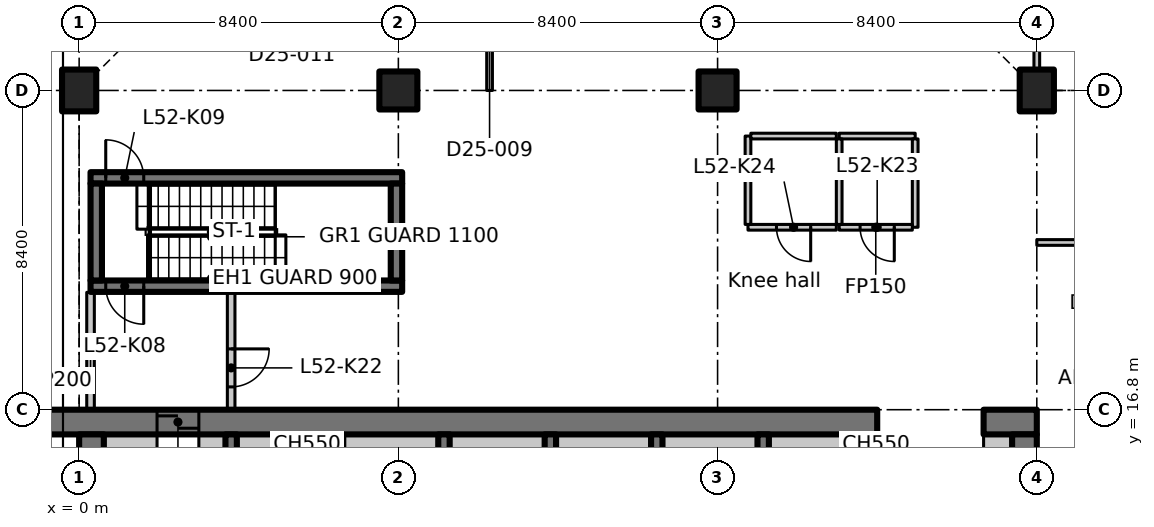
"""IFC4 building model, lengths in metres.
Left out: names, types, materials, properties, quantities, classifications, styles, units other than length and angle.
Written with IfcOpenShell. Run it as: python <this file> out.ifc"""

import sys

from ifc_helpers import new_model, si_unit, direction, frame, frame_2d, origin, origin_2d, place, context, subcontext, project, spatial, rectangle, extrude, element, fill, save


model = new_model("IFC4")
c1 = context("Model", 3, precision=1e-05, world=origin(), true_north=direction((0.0, 1.0)))
c2 = subcontext(c1, "Body", "Model", "MODEL_VIEW")
j1 = project(units=[si_unit("LENGTHUNIT", "METRE"), si_unit("PLANEANGLEUNIT", "RADIAN")], contexts=[c1])
p1 = place(None, origin())
s1 = spatial("IfcSite", under=j1, at=p1, CompositionType="ELEMENT")
p2 = place(p1, origin())
s2 = spatial("IfcBuilding", under=s1, at=p2, CompositionType="ELEMENT")
p3 = place(p2, frame((0.0, 0.0, 206.4)))
s3 = spatial("IfcBuildingStorey", under=s2, at=p3, CompositionType="ELEMENT", Elevation=206.4)
p4 = place(p3, frame((0.0, 25.2, 0.0), z_axis=(0.0, 0.0, 1.0), x_axis=(1.0, 0.0, 0.0)))
e1 = element("IfcColumn", 1, at=p4, inside=s3, PredefinedType="COLUMN", context=c2, shape_type="SweptSolid", body=[
    extrude(rectangle(XDim=0.9, YDim=1.1, at=origin_2d()), origin(), (0.0, 0.0, 1.0), 4.2),
])
for number, where, z_axis, x_axis in (
    (2, (8.4, 25.2, 0.0), (0.0, 0.0, 1.0), (1.0, 0.0, 0.0)),
    (3, (16.8, 25.2, 0.0), (0.0, 0.0, 1.0), (1.0, 0.0, 0.0)),
):
    element("IfcColumn", number, at=place(p3, frame(where, z_axis=z_axis, x_axis=x_axis)), inside=s3, PredefinedType="COLUMN", context=c2, shape_type="SweptSolid", body=[
        extrude(rectangle(XDim=1.0, YDim=1.0, at=origin_2d()), origin(), (0.0, 0.0, 1.0), 4.2),
    ])
p5 = place(p3, frame((25.2, 25.2, 0.0), z_axis=(0.0, 0.0, 1.0), x_axis=(1.0, 0.0, 0.0)))
e4 = element("IfcColumn", 4, at=p5, inside=s3, PredefinedType="COLUMN", context=c2, shape_type="SweptSolid", body=[
    extrude(rectangle(XDim=0.9, YDim=1.1, at=origin_2d()), origin(), (0.0, 0.0, 1.0), 4.2),
])
p6 = place(p3, frame((-1.1, 16.475, 0.0), z_axis=(0.0, 0.0, 1.0), x_axis=(1.0, 0.0, 0.0)))
e5 = element("IfcWall", 5, at=p6, inside=s3, PredefinedType="SHEAR", context=c2, shape_type="SweptSolid", body=[
    extrude(rectangle(XDim=22.1, YDim=0.65, at=frame_2d((11.05, 0.0))), origin(), (0.0, 0.0, 1.0), 4.2),
])
p7 = place(p6, frame((3.15, 0.0, 0.0)))
e6 = element("IfcOpeningElement", 6, at=p7, cuts=e5, PredefinedType="OPENING", context=c2, shape_type="SweptSolid", body=[
    extrude(rectangle(XDim=1.1, YDim=2.3, at=frame_2d((0.55, 1.15))), frame((0.0, 0.335, 0.0), z_axis=(0.0, -1.0, 0.0), x_axis=(1.0, 0.0, 0.0)), (0.0, 0.0, 1.0), 0.67),
])
p8 = place(p3, frame((23.8, 16.475, 0.0), z_axis=(0.0, 0.0, 1.0), x_axis=(1.0, 0.0, 0.0)))
e7 = element("IfcWall", 7, at=p8, inside=s3, PredefinedType="SHEAR", context=c2, shape_type="SweptSolid", body=[
    extrude(rectangle(XDim=1.4, YDim=0.65, at=frame_2d((0.7, 0.0))), origin(), (0.0, 0.0, 1.0), 4.2),
])
p9 = place(p3, frame((0.325, 7.286, 0.0), z_axis=(0.0, 0.0, 1.0), x_axis=(0.0, 1.0, 0.0)))
e8 = element("IfcWall", 8, at=p9, inside=s3, PredefinedType="SHEAR", context=c2, shape_type="SweptSolid", body=[
    extrude(rectangle(XDim=8.864, YDim=0.65, at=frame_2d((4.432, 0.0))), origin(), (0.0, 0.0, 1.0), 4.2),
])
p10 = place(p3, frame((24.875, 12.6, 0.0), z_axis=(0.0, 0.0, 1.0), x_axis=(0.0, 1.0, 0.0)))
e9 = element("IfcWall", 9, at=p10, inside=s3, PredefinedType="SHEAR", context=c2, shape_type="SweptSolid", body=[
    extrude(rectangle(XDim=3.55, YDim=0.65, at=frame_2d((1.775, 0.0))), origin(), (0.0, 0.0, 1.0), 4.2),
])
p11 = place(p3, frame((0.65, 15.875, 0.0), z_axis=(0.0, 0.0, 1.0), x_axis=(1.0, 0.0, 0.0)))
e10 = element("IfcWall", 10, at=p11, inside=s3, PredefinedType="PARTITIONING", context=c2, shape_type="SweptSolid", body=[
    extrude(rectangle(XDim=1.4, YDim=0.55, at=frame_2d((0.7, 0.0))), origin(), (0.0, 0.0, 1.0), 4.2),
])
p12 = place(p3, frame((23.8, 15.875, 0.0), z_axis=(0.0, 0.0, 1.0), x_axis=(1.0, 0.0, 0.0)))
e11 = element("IfcWall", 11, at=p12, inside=s3, PredefinedType="PARTITIONING", context=c2, shape_type="SweptSolid", body=[
    extrude(rectangle(XDim=0.75, YDim=0.55, at=frame_2d((0.375, 0.0))), origin(), (0.0, 0.0, 1.0), 4.2),
])
for number, where, z_axis, x_axis in (
    (12, (4.0, 12.95, 0.0), (0.0, 0.0, 1.0), (0.0, 1.0, 0.0)),
    (13, (6.8, 12.95, 0.0), (0.0, 0.0, 1.0), (0.0, 1.0, 0.0)),
    (14, (9.6, 12.95, 0.0), (0.0, 0.0, 1.0), (0.0, 1.0, 0.0)),
    (15, (12.4, 12.95, 0.0), (0.0, 0.0, 1.0), (0.0, 1.0, 0.0)),
    (16, (15.2, 12.95, 0.0), (0.0, 0.0, 1.0), (0.0, 1.0, 0.0)),
    (17, (18.0, 12.95, 0.0), (0.0, 0.0, 1.0), (0.0, 1.0, 0.0)),
    (18, (20.8, 12.95, 0.0), (0.0, 0.0, 1.0), (0.0, 1.0, 0.0)),
):
    element("IfcWall", number, at=place(p3, frame(where, z_axis=z_axis, x_axis=x_axis)), inside=s3, PredefinedType="SHEAR", context=c2, shape_type="SweptSolid", body=[
        extrude(rectangle(XDim=3.2, YDim=0.3, at=frame_2d((1.6, 0.0))), origin(), (0.0, 0.0, 1.0), 4.2),
    ])
p13 = place(p3, frame((8.5, 20.05, 0.0), z_axis=(0.0, 0.0, 1.0), x_axis=(-1.0, 0.0, 0.0)))
e19 = element("IfcWall", 19, at=p13, inside=s3, PredefinedType="SHEAR", context=c2, shape_type="SweptSolid", body=[
    extrude(rectangle(XDim=8.2, YDim=0.3, at=frame_2d((4.1, 0.0))), origin(), (0.0, 0.0, 1.0), 4.2),
])
p14 = place(p13, frame((6.8, 0.0, 0.0)))
e20 = element("IfcOpeningElement", 20, at=p14, cuts=e19, PredefinedType="OPENING", context=c2, shape_type="SweptSolid", body=[
    extrude(rectangle(XDim=1.0, YDim=2.1, at=frame_2d((0.5, 1.05))), frame((0.0, 0.16, 0.0), z_axis=(0.0, -1.0, 0.0), x_axis=(1.0, 0.0, 0.0)), (0.0, 0.0, 1.0), 0.32),
])
p15 = place(p3, frame((0.3, 22.9, 0.0), z_axis=(0.0, 0.0, 1.0), x_axis=(1.0, 0.0, 0.0)))
e21 = element("IfcWall", 21, at=p15, inside=s3, PredefinedType="SHEAR", context=c2, shape_type="SweptSolid", body=[
    extrude(rectangle(XDim=8.2, YDim=0.3, at=frame_2d((4.1, 0.0))), origin(), (0.0, 0.0, 1.0), 4.2),
])
p16 = place(p15, frame((0.4, 0.0, 0.0)))
e22 = element("IfcOpeningElement", 22, at=p16, cuts=e21, PredefinedType="OPENING", context=c2, shape_type="SweptSolid", body=[
    extrude(rectangle(XDim=1.0, YDim=2.1, at=frame_2d((0.5, 1.05))), frame((0.0, 0.16, 0.0), z_axis=(0.0, -1.0, 0.0), x_axis=(1.0, 0.0, 0.0)), (0.0, 0.0, 1.0), 0.32),
])
for number, where, z_axis, x_axis in (
    (23, (0.45, 20.2, 0.0), (0.0, 0.0, 1.0), (0.0, 1.0, 0.0)),
    (24, (8.35, 20.2, 0.0), (0.0, 0.0, 1.0), (0.0, 1.0, 0.0)),
):
    element("IfcWall", number, at=place(p3, frame(where, z_axis=z_axis, x_axis=x_axis)), inside=s3, PredefinedType="SHEAR", context=c2, shape_type="SweptSolid", body=[
        extrude(rectangle(XDim=2.55, YDim=0.3, at=frame_2d((1.275, 0.0))), origin(), (0.0, 0.0, 1.0), 4.2),
    ])
p17 = place(p3, frame((0.3, 16.812, 0.0), z_axis=(0.0, 0.0, 1.0), x_axis=(0.0, 1.0, 0.0)))
e25 = element("IfcWall", 25, at=p17, inside=s3, PredefinedType="PARTITIONING", context=c2, shape_type="SweptSolid", body=[
    extrude(rectangle(XDim=3.076, YDim=0.2, at=frame_2d((1.538, 0.0))), origin(), (0.0, 0.0, 1.0), 3.83),
])
p18 = place(p3, frame((4.0, 19.888, 0.0), z_axis=(0.0, 0.0, 1.0), x_axis=(0.0, -1.0, 0.0)))
e26 = element("IfcWall", 26, at=p18, inside=s3, PredefinedType="PARTITIONING", context=c2, shape_type="SweptSolid", body=[
    extrude(rectangle(XDim=3.076, YDim=0.2, at=frame_2d((1.538, 0.0))), origin(), (0.0, 0.0, 1.0), 4.2),
])
p19 = place(p18, frame((1.488, 0.0, 0.0)))
e27 = element("IfcOpeningElement", 27, at=p19, cuts=e26, PredefinedType="OPENING", context=c2, shape_type="SweptSolid", body=[
    extrude(rectangle(XDim=1.0, YDim=2.1, at=frame_2d((0.5, 1.05))), frame((0.0, 0.11, 0.0), z_axis=(0.0, -1.0, 0.0), x_axis=(1.0, 0.0, 0.0)), (0.0, 0.0, 1.0), 0.22),
])
p20 = place(p3, frame((20.0, 24.0, 0.0), z_axis=(0.0, 0.0, 1.0), x_axis=(1.0, 0.0, 0.0)))
e28 = element("IfcWall", 28, at=p20, inside=s3, PredefinedType="PARTITIONING", context=c2, shape_type="SweptSolid", body=[
    extrude(rectangle(XDim=2.0, YDim=0.15, at=frame_2d((1.0, 0.0))), origin(), (0.0, 0.0, 1.0), 4.2),
])
p21 = place(p3, frame((22.0, 23.925, 0.0), z_axis=(0.0, 0.0, 1.0), x_axis=(0.0, -1.0, 0.0)))
e29 = element("IfcWall", 29, at=p21, inside=s3, PredefinedType="PARTITIONING", context=c2, shape_type="SweptSolid", body=[
    extrude(rectangle(XDim=2.325, YDim=0.15, at=frame_2d((1.163, 0.0))), origin(), (0.0, 0.0, 1.0), 4.2),
])
p22 = place(p3, frame((21.925, 21.6, 0.0), z_axis=(0.0, 0.0, 1.0), x_axis=(-1.0, 0.0, 0.0)))
e30 = element("IfcWall", 30, at=p22, inside=s3, PredefinedType="PARTITIONING", context=c2, shape_type="SweptSolid", body=[
    extrude(rectangle(XDim=1.925, YDim=0.15, at=frame_2d((0.962, 0.0))), origin(), (0.0, 0.0, 1.0), 4.2),
])
p23 = place(p22, frame((0.475, 0.0, 0.0)))
e31 = element("IfcOpeningElement", 31, at=p23, cuts=e30, PredefinedType="OPENING", context=c2, shape_type="SweptSolid", body=[
    extrude(rectangle(XDim=0.9, YDim=2.1, at=frame_2d((0.45, 1.05))), frame((0.0, 0.085, 0.0), z_axis=(0.0, -1.0, 0.0), x_axis=(1.0, 0.0, 0.0)), (0.0, 0.0, 1.0), 0.17),
])
p24 = place(p3, frame((20.0, 21.675, 0.0), z_axis=(0.0, 0.0, 1.0), x_axis=(0.0, 1.0, 0.0)))
e32 = element("IfcWall", 32, at=p24, inside=s3, PredefinedType="PARTITIONING", context=c2, shape_type="SweptSolid", body=[
    extrude(rectangle(XDim=2.25, YDim=0.15, at=frame_2d((1.125, 0.0))), origin(), (0.0, 0.0, 1.0), 4.2),
])
p25 = place(p3, frame((19.925, 21.6, 0.0), z_axis=(0.0, 0.0, 1.0), x_axis=(-1.0, 0.0, 0.0)))
e33 = element("IfcWall", 33, at=p25, inside=s3, PredefinedType="PARTITIONING", context=c2, shape_type="SweptSolid", body=[
    extrude(rectangle(XDim=2.325, YDim=0.15, at=frame_2d((1.163, 0.0))), origin(), (0.0, 0.0, 1.0), 4.2),
])
p26 = place(p25, frame((0.675, 0.0, 0.0)))
e34 = element("IfcOpeningElement", 34, at=p26, cuts=e33, PredefinedType="OPENING", context=c2, shape_type="SweptSolid", body=[
    extrude(rectangle(XDim=0.9, YDim=2.1, at=frame_2d((0.45, 1.05))), frame((0.0, 0.085, 0.0), z_axis=(0.0, -1.0, 0.0), x_axis=(1.0, 0.0, 0.0)), (0.0, 0.0, 1.0), 0.17),
])
p27 = place(p3, frame((17.6, 21.675, 0.0), z_axis=(0.0, 0.0, 1.0), x_axis=(0.0, 1.0, 0.0)))
e35 = element("IfcWall", 35, at=p27, inside=s3, PredefinedType="PARTITIONING", context=c2, shape_type="SweptSolid", body=[
    extrude(rectangle(XDim=2.325, YDim=0.15, at=frame_2d((1.163, 0.0))), origin(), (0.0, 0.0, 1.0), 4.2),
])
p28 = place(p3, frame((17.675, 24.0, 0.0), z_axis=(0.0, 0.0, 1.0), x_axis=(1.0, 0.0, 0.0)))
e36 = element("IfcWall", 36, at=p28, inside=s3, PredefinedType="PARTITIONING", context=c2, shape_type="SweptSolid", body=[
    extrude(rectangle(XDim=2.25, YDim=0.15, at=frame_2d((1.125, 0.0))), origin(), (0.0, 0.0, 1.0), 4.2),
])
p29 = place(p3, frame((3.15, 15.875, 0.0), z_axis=(0.0, 0.0, 1.0), x_axis=(1.0, 0.0, 0.0)))
e37 = element("IfcWall", 37, at=p29, inside=s3, PredefinedType="PARTITIONING", context=c2, shape_type="SweptSolid", body=[
    extrude(rectangle(XDim=0.7, YDim=0.55, at=frame_2d((0.35, 0.0))), origin(), (0.0, 0.0, 1.0), 4.2),
])
for number, where, z_axis, x_axis in (
    (38, (4.15, 15.875, 0.0), (0.0, 0.0, 1.0), (1.0, 0.0, 0.0)),
    (39, (6.95, 15.875, 0.0), (0.0, 0.0, 1.0), (1.0, 0.0, 0.0)),
    (40, (9.75, 15.875, 0.0), (0.0, 0.0, 1.0), (1.0, 0.0, 0.0)),
    (41, (12.55, 15.875, 0.0), (0.0, 0.0, 1.0), (1.0, 0.0, 0.0)),
    (42, (15.35, 15.875, 0.0), (0.0, 0.0, 1.0), (1.0, 0.0, 0.0)),
    (43, (18.15, 15.875, 0.0), (0.0, 0.0, 1.0), (1.0, 0.0, 0.0)),
):
    element("IfcWall", number, at=place(p3, frame(where, z_axis=z_axis, x_axis=x_axis)), inside=s3, PredefinedType="PARTITIONING", context=c2, shape_type="SweptSolid", body=[
        extrude(rectangle(XDim=2.5, YDim=0.55, at=frame_2d((1.25, 0.0))), origin(), (0.0, 0.0, 1.0), 4.2),
    ])
p30 = place(p3, frame((20.95, 15.875, 0.0), z_axis=(0.0, 0.0, 1.0), x_axis=(1.0, 0.0, 0.0)))
e44 = element("IfcWall", 44, at=p30, inside=s3, PredefinedType="PARTITIONING", context=c2, shape_type="SweptSolid", body=[
    extrude(rectangle(XDim=0.05, YDim=0.55, at=frame_2d((0.025, 0.0))), origin(), (0.0, 0.0, 1.0), 4.2),
])
p31 = place(p3, frame((25.2, 21.2, 0.0), z_axis=(0.0, 0.0, 1.0), x_axis=(1.0, 0.0, 0.0)))
e45 = element("IfcWall", 45, at=p31, inside=s3, PredefinedType="PARTITIONING", context=c2, shape_type="SweptSolid", body=[
    extrude(rectangle(XDim=4.2, YDim=0.15, at=frame_2d((2.1, 0.0))), origin(), (0.0, 0.0, 1.0), 4.18),
])
p32 = place(p31, frame((1.5, 0.0, 0.0)))
e46 = element("IfcOpeningElement", 46, at=p32, cuts=e45, PredefinedType="OPENING", context=c2, shape_type="SweptSolid", body=[
    extrude(rectangle(XDim=1.0, YDim=2.1, at=frame_2d((0.5, 1.05))), frame((0.0, 0.085, 0.0), z_axis=(0.0, -1.0, 0.0), x_axis=(1.0, 0.0, 0.0)), (0.0, 0.0, 1.0), 0.17),
])
p33 = place(p3, frame((25.2, 25.77, 0.0), z_axis=(0.0, 0.0, 1.0), x_axis=(0.0, 1.0, 0.0)))
e47 = element("IfcWall", 47, at=p33, inside=s3, PredefinedType="PARTITIONING", context=c2, shape_type="SweptSolid", body=[
    extrude(rectangle(XDim=3.83, YDim=0.15, at=frame_2d((1.915, 0.0))), origin(), (0.0, 0.0, 1.0), 3.83),
])
p34 = place(p3, frame((10.8, 25.2, 0.0), z_axis=(0.0, 0.0, 1.0), x_axis=(0.0, 1.0, 0.0)))
e48 = element("IfcWall", 48, at=p34, inside=s3, PredefinedType="PARTITIONING", context=c2, shape_type="SweptSolid", body=[
    extrude(rectangle(XDim=4.2, YDim=0.15, at=frame_2d((2.1, 0.0))), origin(), (0.0, 0.0, 1.0), 4.18),
])
p35 = place(p34, frame((1.2, 0.0, 0.0)))
e49 = element("IfcOpeningElement", 49, at=p35, cuts=e48, PredefinedType="OPENING", context=c2, shape_type="SweptSolid", body=[
    extrude(rectangle(XDim=2.0, YDim=2.4, at=frame_2d((1.0, 1.2))), frame((0.0, 0.085, 0.0), z_axis=(0.0, -1.0, 0.0), x_axis=(1.0, 0.0, 0.0)), (0.0, 0.0, 1.0), 0.17),
])
p36 = place(p7, origin())
e50 = element("IfcDoor", 50, at=p36, inside=s3, OperationType="SLIDING_TO_LEFT", PredefinedType="DOOR", context=c2, shape_type="SweptSolid", body=[
    extrude(rectangle(XDim=1.1, YDim=2.3, at=frame_2d((0.55, 1.15))), frame((0.0, 0.025, 0.0), z_axis=(0.0, -1.0, 0.0), x_axis=(1.0, 0.0, 0.0)), (0.0, 0.0, 1.0), 0.05),
])
fill(e6, e50)
p37 = place(p14, origin())
e51 = element("IfcDoor", 51, at=p37, inside=s3, OperationType="SINGLE_SWING_LEFT", PredefinedType="DOOR", context=c2, shape_type="SweptSolid", body=[
    extrude(rectangle(XDim=1.0, YDim=2.1, at=frame_2d((0.5, 1.05))), frame((0.0, 0.025, 0.0), z_axis=(0.0, -1.0, 0.0), x_axis=(1.0, 0.0, 0.0)), (0.0, 0.0, 1.0), 0.05),
])
fill(e20, e51)
p38 = place(p16, origin())
e52 = element("IfcDoor", 52, at=p38, inside=s3, OperationType="SINGLE_SWING_RIGHT", PredefinedType="DOOR", context=c2, shape_type="SweptSolid", body=[
    extrude(rectangle(XDim=1.0, YDim=2.1, at=frame_2d((0.5, 1.05))), frame((0.0, 0.025, 0.0), z_axis=(0.0, -1.0, 0.0), x_axis=(1.0, 0.0, 0.0)), (0.0, 0.0, 1.0), 0.05),
])
fill(e22, e52)
p39 = place(p19, origin())
e53 = element("IfcDoor", 53, at=p39, inside=s3, OperationType="SINGLE_SWING_LEFT", PredefinedType="DOOR", context=c2, shape_type="SweptSolid", body=[
    extrude(rectangle(XDim=1.0, YDim=2.1, at=frame_2d((0.5, 1.05))), frame((0.0, 0.025, 0.0), z_axis=(0.0, -1.0, 0.0), x_axis=(1.0, 0.0, 0.0)), (0.0, 0.0, 1.0), 0.05),
])
fill(e27, e53)
p40 = place(p23, origin())
e54 = element("IfcDoor", 54, at=p40, inside=s3, OperationType="SINGLE_SWING_RIGHT", PredefinedType="DOOR", context=c2, shape_type="SweptSolid", body=[
    extrude(rectangle(XDim=0.9, YDim=2.1, at=frame_2d((0.45, 1.05))), frame((0.0, 0.025, 0.0), z_axis=(0.0, -1.0, 0.0), x_axis=(1.0, 0.0, 0.0)), (0.0, 0.0, 1.0), 0.05),
])
fill(e31, e54)
p41 = place(p26, origin())
e55 = element("IfcDoor", 55, at=p41, inside=s3, OperationType="SINGLE_SWING_LEFT", PredefinedType="DOOR", context=c2, shape_type="SweptSolid", body=[
    extrude(rectangle(XDim=0.9, YDim=2.1, at=frame_2d((0.45, 1.05))), frame((0.0, 0.025, 0.0), z_axis=(0.0, -1.0, 0.0), x_axis=(1.0, 0.0, 0.0)), (0.0, 0.0, 1.0), 0.05),
])
fill(e34, e55)
save(model, sys.argv[1])
